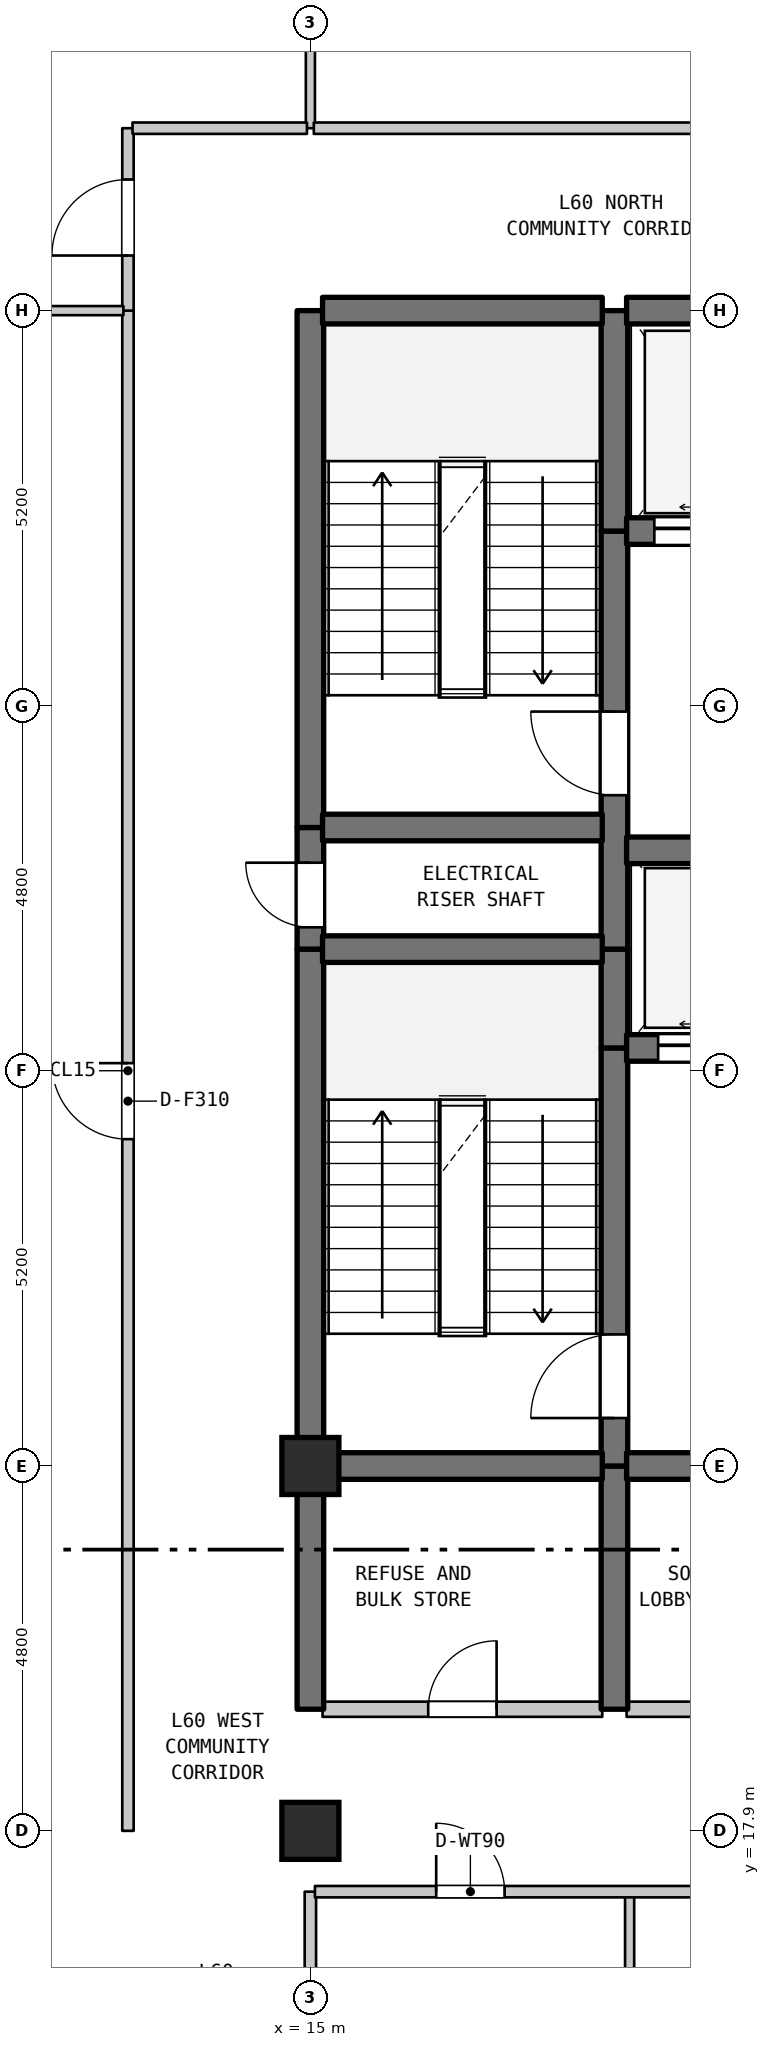
"""IFC4 building model, lengths in metres.
Left out: names, types, materials, properties, quantities, classifications, styles, units other than length and angle.
Written with IfcOpenShell. Run it as: python <this file> out.ifc"""

import sys

from ifc_helpers import new_model, si_unit, direction, frame, frame_2d, origin, origin_2d, place, context, subcontext, project, spatial, rectangle, extrude, element, fill, save


model = new_model("IFC4")
c1 = context("Model", 3, precision=1e-05, world=origin(), true_north=direction((0.0, 1.0)))
c2 = subcontext(c1, "Body", "Model", "MODEL_VIEW")
j1 = project(units=[si_unit("LENGTHUNIT", "METRE"), si_unit("PLANEANGLEUNIT", "RADIAN")], contexts=[c1])
p1 = place(None, origin())
s1 = spatial("IfcSite", under=j1, at=p1, CompositionType="ELEMENT")
p2 = place(p1, origin())
s2 = spatial("IfcBuilding", under=s1, at=p2, CompositionType="ELEMENT")
p3 = place(p2, frame((0.0, 0.0, 242.8)))
s3 = spatial("IfcBuildingStorey", under=s2, at=p3, CompositionType="ELEMENT", Elevation=242.8)
for number, where, z_axis, x_axis in (
    (1, (15.0, 17.9, 0.0), (0.0, 0.0, 1.0), (1.0, 0.0, 0.0)),
    (2, (15.0, 22.7, 0.0), (0.0, 0.0, 1.0), (1.0, 0.0, 0.0)),
):
    element("IfcColumn", number, at=place(p3, frame(where, z_axis=z_axis, x_axis=x_axis)), inside=s3, PredefinedType="COLUMN", context=c2, shape_type="SweptSolid", body=[
        extrude(rectangle(XDim=0.75, YDim=0.75, at=origin_2d()), origin(), (0.0, 0.0, 1.0), 4.5),
    ])
p4 = place(p3, frame((12.6, 17.9, 0.0), z_axis=(0.0, 0.0, 1.0), x_axis=(0.0, 1.0, 0.0)))
e3 = element("IfcWall", 3, at=p4, inside=s3, PredefinedType="STANDARD", context=c2, shape_type="SweptSolid", body=[
    extrude(rectangle(XDim=20.0, YDim=0.15, at=frame_2d((10.0, 0.0))), origin(), (0.0, 0.0, 1.0), 4.19),
])
p5 = place(p4, frame((9.1, 0.0, 0.0)))
e4 = element("IfcOpeningElement", 4, at=p5, cuts=e3, PredefinedType="OPENING", context=c2, shape_type="SweptSolid", body=[
    extrude(rectangle(XDim=1.0, YDim=2.15, at=frame_2d((0.5, 1.075))), frame((0.0, 0.085, 0.0), z_axis=(0.0, -1.0, 0.0), x_axis=(1.0, 0.0, 0.0)), (0.0, 0.0, 1.0), 0.17),
])
p6 = place(p3, frame((12.6, 37.9, 0.0), z_axis=(0.0, 0.0, 1.0), x_axis=(0.0, 1.0, 0.0)))
e5 = element("IfcWall", 5, at=p6, inside=s3, PredefinedType="STANDARD", context=c2, shape_type="SweptSolid", body=[
    extrude(rectangle(XDim=2.4, YDim=0.15, at=frame_2d((1.2, 0.0))), origin(), (0.0, 0.0, 1.0), 4.19),
])
p7 = place(p6, frame((0.725, 0.0, 0.0)))
e6 = element("IfcOpeningElement", 6, at=p7, cuts=e5, PredefinedType="OPENING", context=c2, shape_type="SweptSolid", body=[
    extrude(rectangle(XDim=1.0, YDim=2.15, at=frame_2d((0.5, 1.075))), frame((0.0, 0.085, 0.0), z_axis=(0.0, -1.0, 0.0), x_axis=(1.0, 0.0, 0.0)), (0.0, 0.0, 1.0), 0.17),
])
p8 = place(p3, frame((15.0, 13.0, 0.0), z_axis=(0.0, 0.0, 1.0), x_axis=(0.0, 1.0, 0.0)))
e7 = element("IfcWall", 7, at=p8, inside=s3, PredefinedType="STANDARD", context=c2, shape_type="SweptSolid", body=[
    extrude(rectangle(XDim=4.1, YDim=0.15, at=frame_2d((2.05, 0.0))), origin(), (0.0, 0.0, 1.0), 3.9),
])
p9 = place(p3, frame((15.0, 19.5, 0.0), z_axis=(0.0, 0.0, 1.0), x_axis=(0.0, 1.0, 0.0)))
e8 = element("IfcWall", 8, at=p9, inside=s3, PredefinedType="SHEAR", context=c2, shape_type="SweptSolid", body=[
    extrude(rectangle(XDim=3.2, YDim=0.35, at=frame_2d((1.6, 0.0))), origin(), (0.0, 0.0, 1.0), 4.19),
])
p10 = place(p3, frame((15.0, 22.7, 0.0), z_axis=(0.0, 0.0, 1.0), x_axis=(0.0, 1.0, 0.0)))
e9 = element("IfcWall", 9, at=p10, inside=s3, PredefinedType="SHEAR", context=c2, shape_type="SweptSolid", body=[
    extrude(rectangle(XDim=6.8, YDim=0.35, at=frame_2d((3.4, 0.0))), origin(), (0.0, 0.0, 1.0), 4.19),
])
p11 = place(p3, frame((15.0, 29.5, 0.0), z_axis=(0.0, 0.0, 1.0), x_axis=(0.0, 1.0, 0.0)))
e10 = element("IfcWall", 10, at=p11, inside=s3, PredefinedType="SHEAR", context=c2, shape_type="SweptSolid", body=[
    extrude(rectangle(XDim=1.6, YDim=0.35, at=frame_2d((0.8, 0.0))), origin(), (0.0, 0.0, 1.0), 4.19),
])
p12 = place(p11, frame((0.287, 0.0, 0.0)))
e11 = element("IfcOpeningElement", 11, at=p12, cuts=e10, PredefinedType="OPENING", context=c2, shape_type="SweptSolid", body=[
    extrude(rectangle(XDim=0.85, YDim=2.1, at=frame_2d((0.425, 1.05))), frame((0.0, 0.185, 0.0), z_axis=(0.0, -1.0, 0.0), x_axis=(1.0, 0.0, 0.0)), (0.0, 0.0, 1.0), 0.37),
])
p13 = place(p3, frame((15.0, 31.1, 0.0), z_axis=(0.0, 0.0, 1.0), x_axis=(0.0, 1.0, 0.0)))
e12 = element("IfcWall", 12, at=p13, inside=s3, PredefinedType="SHEAR", context=c2, shape_type="SweptSolid", body=[
    extrude(rectangle(XDim=6.8, YDim=0.35, at=frame_2d((3.4, 0.0))), origin(), (0.0, 0.0, 1.0), 4.19),
])
p14 = place(p3, frame((15.0, 40.3, 0.0), z_axis=(0.0, 0.0, 1.0), x_axis=(0.0, 1.0, 0.0)))
e13 = element("IfcWall", 13, at=p14, inside=s3, PredefinedType="PARTITIONING", context=c2, shape_type="SweptSolid", body=[
    extrude(rectangle(XDim=12.933, YDim=0.12, at=frame_2d((6.466, 0.0))), origin(), (0.0, 0.0, 1.0), 4.19),
])
p15 = place(p3, frame((19.0, 19.5, 0.0), z_axis=(0.0, 0.0, 1.0), x_axis=(0.0, 1.0, 0.0)))
e14 = element("IfcWall", 14, at=p15, inside=s3, PredefinedType="SHEAR", context=c2, shape_type="SweptSolid", body=[
    extrude(rectangle(XDim=3.2, YDim=0.35, at=frame_2d((1.6, 0.0))), origin(), (0.0, 0.0, 1.0), 4.19),
])
p16 = place(p3, frame((19.0, 22.7, 0.0), z_axis=(0.0, 0.0, 1.0), x_axis=(0.0, 1.0, 0.0)))
e15 = element("IfcWall", 15, at=p16, inside=s3, PredefinedType="SHEAR", context=c2, shape_type="SweptSolid", body=[
    extrude(rectangle(XDim=5.5, YDim=0.35, at=frame_2d((2.75, 0.0))), origin(), (0.0, 0.0, 1.0), 4.19),
])
p17 = place(p16, frame((0.631, 0.0, 0.0)))
e16 = element("IfcOpeningElement", 16, at=p17, cuts=e15, PredefinedType="OPENING", context=c2, shape_type="SweptSolid", body=[
    extrude(rectangle(XDim=1.1, YDim=2.15, at=frame_2d((0.55, 1.075))), frame((0.0, 0.185, 0.0), z_axis=(0.0, -1.0, 0.0), x_axis=(1.0, 0.0, 0.0)), (0.0, 0.0, 1.0), 0.37),
])
p18 = place(p3, frame((19.0, 28.2, 0.0), z_axis=(0.0, 0.0, 1.0), x_axis=(0.0, 1.0, 0.0)))
e17 = element("IfcWall", 17, at=p18, inside=s3, PredefinedType="SHEAR", context=c2, shape_type="SweptSolid", body=[
    extrude(rectangle(XDim=1.3, YDim=0.35, at=frame_2d((0.65, 0.0))), origin(), (0.0, 0.0, 1.0), 4.19),
])
p19 = place(p3, frame((19.0, 29.5, 0.0), z_axis=(0.0, 0.0, 1.0), x_axis=(0.0, 1.0, 0.0)))
e18 = element("IfcWall", 18, at=p19, inside=s3, PredefinedType="SHEAR", context=c2, shape_type="SweptSolid", body=[
    extrude(rectangle(XDim=5.5, YDim=0.35, at=frame_2d((2.75, 0.0))), origin(), (0.0, 0.0, 1.0), 4.19),
])
p20 = place(p19, frame((2.025, 0.0, 0.0)))
e19 = element("IfcOpeningElement", 19, at=p20, cuts=e18, PredefinedType="OPENING", context=c2, shape_type="SweptSolid", body=[
    extrude(rectangle(XDim=1.1, YDim=2.15, at=frame_2d((0.55, 1.075))), frame((0.0, 0.185, 0.0), z_axis=(0.0, -1.0, 0.0), x_axis=(1.0, 0.0, 0.0)), (0.0, 0.0, 1.0), 0.37),
])
p21 = place(p3, frame((19.0, 35.0, 0.0), z_axis=(0.0, 0.0, 1.0), x_axis=(0.0, 1.0, 0.0)))
e20 = element("IfcWall", 20, at=p21, inside=s3, PredefinedType="SHEAR", context=c2, shape_type="SweptSolid", body=[
    extrude(rectangle(XDim=2.9, YDim=0.35, at=frame_2d((1.45, 0.0))), origin(), (0.0, 0.0, 1.0), 4.19),
])
p22 = place(p3, frame((19.2, 13.0, 0.0), z_axis=(0.0, 0.0, 1.0), x_axis=(0.0, 1.0, 0.0)))
e21 = element("IfcWall", 21, at=p22, inside=s3, PredefinedType="PARTITIONING", context=c2, shape_type="SweptSolid", body=[
    extrude(rectangle(XDim=4.1, YDim=0.12, at=frame_2d((2.05, 0.0))), origin(), (0.0, 0.0, 1.0), 4.19),
])
p23 = place(p3, frame((15.06, 17.1, 0.0), z_axis=(0.0, 0.0, 1.0), x_axis=(1.0, 0.0, 0.0)))
e22 = element("IfcWall", 22, at=p23, inside=s3, PredefinedType="STANDARD", context=c2, shape_type="SweptSolid", body=[
    extrude(rectangle(XDim=8.295, YDim=0.15, at=frame_2d((4.147, 0.0))), origin(), (0.0, 0.0, 1.0), 4.19),
])
p24 = place(p23, frame((1.595, 0.0, 0.0)))
e23 = element("IfcOpeningElement", 23, at=p24, cuts=e22, PredefinedType="OPENING", context=c2, shape_type="SweptSolid", body=[
    extrude(rectangle(XDim=0.9, YDim=2.1, at=frame_2d((0.45, 1.05))), frame((0.0, 0.085, 0.0), z_axis=(0.0, -1.0, 0.0), x_axis=(1.0, 0.0, 0.0)), (0.0, 0.0, 1.0), 0.17),
])
p25 = place(p23, frame((5.645, 0.0, 0.0)))
e24 = element("IfcOpeningElement", 24, at=p25, cuts=e22, PredefinedType="OPENING", context=c2, shape_type="SweptSolid", body=[
    extrude(rectangle(XDim=0.9, YDim=2.1, at=frame_2d((0.45, 1.05))), frame((0.0, 0.085, 0.0), z_axis=(0.0, -1.0, 0.0), x_axis=(1.0, 0.0, 0.0)), (0.0, 0.0, 1.0), 0.17),
])
p26 = place(p3, frame((15.16, 19.5, 0.0), z_axis=(0.0, 0.0, 1.0), x_axis=(1.0, 0.0, 0.0)))
e25 = element("IfcWall", 25, at=p26, inside=s3, PredefinedType="STANDARD", context=c2, shape_type="SweptSolid", body=[
    extrude(rectangle(XDim=3.68, YDim=0.2, at=frame_2d((1.84, 0.0))), origin(), (0.0, 0.0, 1.0), 4.19),
])
p27 = place(p26, frame((1.39, 0.0, 0.0)))
e26 = element("IfcOpeningElement", 26, at=p27, cuts=e25, PredefinedType="OPENING", context=c2, shape_type="SweptSolid", body=[
    extrude(rectangle(XDim=0.9, YDim=2.15, at=frame_2d((0.45, 1.075))), frame((0.0, 0.11, 0.0), z_axis=(0.0, -1.0, 0.0), x_axis=(1.0, 0.0, 0.0)), (0.0, 0.0, 1.0), 0.22),
])
p28 = place(p3, frame((19.16, 19.5, 0.0), z_axis=(0.0, 0.0, 1.0), x_axis=(1.0, 0.0, 0.0)))
e27 = element("IfcWall", 27, at=p28, inside=s3, PredefinedType="STANDARD", context=c2, shape_type="SweptSolid", body=[
    extrude(rectangle(XDim=4.48, YDim=0.2, at=frame_2d((2.24, 0.0))), origin(), (0.0, 0.0, 1.0), 4.19),
])
p29 = place(p28, frame((1.64, 0.0, 0.0)))
e28 = element("IfcOpeningElement", 28, at=p29, cuts=e27, PredefinedType="OPENING", context=c2, shape_type="SweptSolid", body=[
    extrude(rectangle(XDim=1.2, YDim=2.2, at=frame_2d((0.6, 1.1))), frame((0.0, 0.11, 0.0), z_axis=(0.0, -1.0, 0.0), x_axis=(1.0, 0.0, 0.0)), (0.0, 0.0, 1.0), 0.22),
])
p30 = place(p3, frame((15.16, 22.7, 0.0), z_axis=(0.0, 0.0, 1.0), x_axis=(1.0, 0.0, 0.0)))
e29 = element("IfcWall", 29, at=p30, inside=s3, PredefinedType="SHEAR", context=c2, shape_type="SweptSolid", body=[
    extrude(rectangle(XDim=3.68, YDim=0.35, at=frame_2d((1.84, 0.0))), origin(), (0.0, 0.0, 1.0), 4.19),
])
p31 = place(p3, frame((19.16, 22.7, 0.0), z_axis=(0.0, 0.0, 1.0), x_axis=(1.0, 0.0, 0.0)))
e30 = element("IfcWall", 30, at=p31, inside=s3, PredefinedType="SHEAR", context=c2, shape_type="SweptSolid", body=[
    extrude(rectangle(XDim=4.48, YDim=0.35, at=frame_2d((2.24, 0.0))), origin(), (0.0, 0.0, 1.0), 4.19),
])
p32 = place(p31, frame((1.64, 0.0, 0.0)))
e31 = element("IfcOpeningElement", 31, at=p32, cuts=e30, PredefinedType="OPENING", context=c2, shape_type="SweptSolid", body=[
    extrude(rectangle(XDim=1.2, YDim=2.2, at=frame_2d((0.6, 1.1))), frame((0.0, 0.185, 0.0), z_axis=(0.0, -1.0, 0.0), x_axis=(1.0, 0.0, 0.0)), (0.0, 0.0, 1.0), 0.37),
])
p33 = place(p3, frame((19.16, 28.2, 0.0), z_axis=(0.0, 0.0, 1.0), x_axis=(1.0, 0.0, 0.0)))
e32 = element("IfcWall", 32, at=p33, inside=s3, PredefinedType="SHEAR", context=c2, shape_type="SweptSolid", body=[
    extrude(rectangle(XDim=4.48, YDim=0.35, at=frame_2d((2.24, 0.0))), origin(), (0.0, 0.0, 1.0), 4.19),
])
p34 = place(p33, frame((0.415, 0.0, 0.0)))
e33 = element("IfcOpeningElement", 33, at=p34, cuts=e32, PredefinedType="OPENING", context=c2, shape_type="SweptSolid", body=[
    extrude(rectangle(XDim=1.25, YDim=2.2, at=frame_2d((0.625, 1.1))), frame((0.0, 0.185, 0.0), z_axis=(0.0, -1.0, 0.0), x_axis=(1.0, 0.0, 0.0)), (0.0, 0.0, 1.0), 0.37),
])
p35 = place(p33, frame((2.815, 0.0, 0.0)))
e34 = element("IfcOpeningElement", 34, at=p35, cuts=e32, PredefinedType="OPENING", context=c2, shape_type="SweptSolid", body=[
    extrude(rectangle(XDim=1.25, YDim=2.2, at=frame_2d((0.625, 1.1))), frame((0.0, 0.185, 0.0), z_axis=(0.0, -1.0, 0.0), x_axis=(1.0, 0.0, 0.0)), (0.0, 0.0, 1.0), 0.37),
])
p36 = place(p3, frame((15.16, 29.5, 0.0), z_axis=(0.0, 0.0, 1.0), x_axis=(1.0, 0.0, 0.0)))
e35 = element("IfcWall", 35, at=p36, inside=s3, PredefinedType="SHEAR", context=c2, shape_type="SweptSolid", body=[
    extrude(rectangle(XDim=3.68, YDim=0.35, at=frame_2d((1.84, 0.0))), origin(), (0.0, 0.0, 1.0), 4.19),
])
p37 = place(p3, frame((19.16, 30.8, 0.0), z_axis=(0.0, 0.0, 1.0), x_axis=(1.0, 0.0, 0.0)))
e36 = element("IfcWall", 36, at=p37, inside=s3, PredefinedType="SHEAR", context=c2, shape_type="SweptSolid", body=[
    extrude(rectangle(XDim=4.48, YDim=0.35, at=frame_2d((2.24, 0.0))), origin(), (0.0, 0.0, 1.0), 4.19),
])
p38 = place(p3, frame((15.16, 31.1, 0.0), z_axis=(0.0, 0.0, 1.0), x_axis=(1.0, 0.0, 0.0)))
e37 = element("IfcWall", 37, at=p38, inside=s3, PredefinedType="SHEAR", context=c2, shape_type="SweptSolid", body=[
    extrude(rectangle(XDim=3.68, YDim=0.35, at=frame_2d((1.84, 0.0))), origin(), (0.0, 0.0, 1.0), 4.19),
])
p39 = place(p3, frame((19.16, 35.0, 0.0), z_axis=(0.0, 0.0, 1.0), x_axis=(1.0, 0.0, 0.0)))
e38 = element("IfcWall", 38, at=p39, inside=s3, PredefinedType="SHEAR", context=c2, shape_type="SweptSolid", body=[
    extrude(rectangle(XDim=4.48, YDim=0.35, at=frame_2d((2.24, 0.0))), origin(), (0.0, 0.0, 1.0), 4.19),
])
p40 = place(p39, frame((0.365, 0.0, 0.0)))
e39 = element("IfcOpeningElement", 39, at=p40, cuts=e38, PredefinedType="OPENING", context=c2, shape_type="SweptSolid", body=[
    extrude(rectangle(XDim=1.35, YDim=2.2, at=frame_2d((0.675, 1.1))), frame((0.0, 0.185, 0.0), z_axis=(0.0, -1.0, 0.0), x_axis=(1.0, 0.0, 0.0)), (0.0, 0.0, 1.0), 0.37),
])
p41 = place(p39, frame((2.765, 0.0, 0.0)))
e40 = element("IfcOpeningElement", 40, at=p41, cuts=e38, PredefinedType="OPENING", context=c2, shape_type="SweptSolid", body=[
    extrude(rectangle(XDim=1.35, YDim=2.2, at=frame_2d((0.675, 1.1))), frame((0.0, 0.185, 0.0), z_axis=(0.0, -1.0, 0.0), x_axis=(1.0, 0.0, 0.0)), (0.0, 0.0, 1.0), 0.37),
])
p42 = place(p3, frame((8.856, 37.9, 0.0), z_axis=(0.0, 0.0, 1.0), x_axis=(1.0, 0.0, 0.0)))
e41 = element("IfcWall", 41, at=p42, inside=s3, PredefinedType="PARTITIONING", context=c2, shape_type="SweptSolid", body=[
    extrude(rectangle(XDim=3.684, YDim=0.12, at=frame_2d((1.842, 0.0))), origin(), (0.0, 0.0, 1.0), 3.84),
])
p43 = place(p3, frame((15.16, 37.9, 0.0), z_axis=(0.0, 0.0, 1.0), x_axis=(1.0, 0.0, 0.0)))
e42 = element("IfcWall", 42, at=p43, inside=s3, PredefinedType="SHEAR", context=c2, shape_type="SweptSolid", body=[
    extrude(rectangle(XDim=3.68, YDim=0.35, at=frame_2d((1.84, 0.0))), origin(), (0.0, 0.0, 1.0), 4.19),
])
p44 = place(p3, frame((19.16, 37.9, 0.0), z_axis=(0.0, 0.0, 1.0), x_axis=(1.0, 0.0, 0.0)))
e43 = element("IfcWall", 43, at=p44, inside=s3, PredefinedType="SHEAR", context=c2, shape_type="SweptSolid", body=[
    extrude(rectangle(XDim=4.48, YDim=0.35, at=frame_2d((2.24, 0.0))), origin(), (0.0, 0.0, 1.0), 4.19),
])
p45 = place(p3, frame((12.66, 40.3, 0.0), z_axis=(0.0, 0.0, 1.0), x_axis=(1.0, 0.0, 0.0)))
e44 = element("IfcWall", 44, at=p45, inside=s3, PredefinedType="STANDARD", context=c2, shape_type="SweptSolid", body=[
    extrude(rectangle(XDim=2.295, YDim=0.15, at=frame_2d((1.147, 0.0))), origin(), (0.0, 0.0, 1.0), 4.19),
])
p46 = place(p3, frame((15.045, 40.3, 0.0), z_axis=(0.0, 0.0, 1.0), x_axis=(1.0, 0.0, 0.0)))
e45 = element("IfcWall", 45, at=p46, inside=s3, PredefinedType="STANDARD", context=c2, shape_type="SweptSolid", body=[
    extrude(rectangle(XDim=17.895, YDim=0.15, at=frame_2d((8.948, 0.0))), origin(), (0.0, 0.0, 1.0), 4.19),
])
p47 = place(p46, frame((9.205, 0.0, 0.0)))
e46 = element("IfcOpeningElement", 46, at=p47, cuts=e45, PredefinedType="OPENING", context=c2, shape_type="SweptSolid", body=[
    extrude(rectangle(XDim=1.0, YDim=2.15, at=frame_2d((0.5, 1.075))), frame((0.0, 0.085, 0.0), z_axis=(0.0, -1.0, 0.0), x_axis=(1.0, 0.0, 0.0)), (0.0, 0.0, 1.0), 0.17),
])
p48 = place(p5, origin())
e47 = element("IfcDoor", 47, at=p48, inside=s3, OperationType="SINGLE_SWING_RIGHT", PredefinedType="DOOR", context=c2, shape_type="SweptSolid", body=[
    extrude(rectangle(XDim=1.0, YDim=2.15, at=frame_2d((0.5, 1.075))), frame((0.0, 0.025, 0.0), z_axis=(0.0, -1.0, 0.0), x_axis=(1.0, 0.0, 0.0)), (0.0, 0.0, 1.0), 0.05),
])
fill(e4, e47)
p49 = place(p7, origin())
e48 = element("IfcDoor", 48, at=p49, inside=s3, OperationType="SINGLE_SWING_LEFT", PredefinedType="DOOR", context=c2, shape_type="SweptSolid", body=[
    extrude(rectangle(XDim=1.0, YDim=2.15, at=frame_2d((0.5, 1.075))), frame((0.0, 0.025, 0.0), z_axis=(0.0, -1.0, 0.0), x_axis=(1.0, 0.0, 0.0)), (0.0, 0.0, 1.0), 0.05),
])
fill(e6, e48)
p50 = place(p12, origin())
e49 = element("IfcDoor", 49, at=p50, inside=s3, OperationType="SINGLE_SWING_RIGHT", PredefinedType="DOOR", context=c2, shape_type="SweptSolid", body=[
    extrude(rectangle(XDim=0.85, YDim=2.1, at=frame_2d((0.425, 1.05))), frame((0.0, 0.025, 0.0), z_axis=(0.0, -1.0, 0.0), x_axis=(1.0, 0.0, 0.0)), (0.0, 0.0, 1.0), 0.05),
])
fill(e11, e49)
p51 = place(p17, origin())
e50 = element("IfcDoor", 50, at=p51, inside=s3, OperationType="SINGLE_SWING_LEFT", PredefinedType="DOOR", context=c2, shape_type="SweptSolid", body=[
    extrude(rectangle(XDim=1.1, YDim=2.15, at=frame_2d((0.55, 1.075))), frame((0.0, 0.025, 0.0), z_axis=(0.0, -1.0, 0.0), x_axis=(1.0, 0.0, 0.0)), (0.0, 0.0, 1.0), 0.05),
])
fill(e16, e50)
p52 = place(p20, origin())
e51 = element("IfcDoor", 51, at=p52, inside=s3, OperationType="SINGLE_SWING_RIGHT", PredefinedType="DOOR", context=c2, shape_type="SweptSolid", body=[
    extrude(rectangle(XDim=1.1, YDim=2.15, at=frame_2d((0.55, 1.075))), frame((0.0, 0.025, 0.0), z_axis=(0.0, -1.0, 0.0), x_axis=(1.0, 0.0, 0.0)), (0.0, 0.0, 1.0), 0.05),
])
fill(e19, e51)
p53 = place(p24, origin())
e52 = element("IfcDoor", 52, at=p53, inside=s3, OperationType="SINGLE_SWING_LEFT", PredefinedType="DOOR", context=c2, shape_type="SweptSolid", body=[
    extrude(rectangle(XDim=0.9, YDim=2.1, at=frame_2d((0.45, 1.05))), frame((0.0, 0.025, 0.0), z_axis=(0.0, -1.0, 0.0), x_axis=(1.0, 0.0, 0.0)), (0.0, 0.0, 1.0), 0.05),
])
fill(e23, e52)
p54 = place(p27, origin())
e53 = element("IfcDoor", 53, at=p54, inside=s3, OperationType="SINGLE_SWING_RIGHT", PredefinedType="DOOR", context=c2, shape_type="SweptSolid", body=[
    extrude(rectangle(XDim=0.9, YDim=2.15, at=frame_2d((0.45, 1.075))), frame((0.0, 0.025, 0.0), z_axis=(0.0, -1.0, 0.0), x_axis=(1.0, 0.0, 0.0)), (0.0, 0.0, 1.0), 0.05),
])
fill(e26, e53)
p55 = place(p34, origin())
e54 = element("IfcDoor", 54, at=p55, inside=s3, OperationType="DOUBLE_DOOR_SLIDING", PredefinedType="DOOR", context=c2, shape_type="SweptSolid", body=[
    extrude(rectangle(XDim=1.25, YDim=2.2, at=frame_2d((0.625, 1.1))), frame((0.0, 0.025, 0.0), z_axis=(0.0, -1.0, 0.0), x_axis=(1.0, 0.0, 0.0)), (0.0, 0.0, 1.0), 0.05),
])
fill(e33, e54)
p56 = place(p40, origin())
e55 = element("IfcDoor", 55, at=p56, inside=s3, OperationType="DOUBLE_DOOR_SLIDING", PredefinedType="DOOR", context=c2, shape_type="SweptSolid", body=[
    extrude(rectangle(XDim=1.35, YDim=2.2, at=frame_2d((0.675, 1.1))), frame((0.0, 0.025, 0.0), z_axis=(0.0, -1.0, 0.0), x_axis=(1.0, 0.0, 0.0)), (0.0, 0.0, 1.0), 0.05),
])
fill(e39, e55)
save(model, sys.argv[1])
